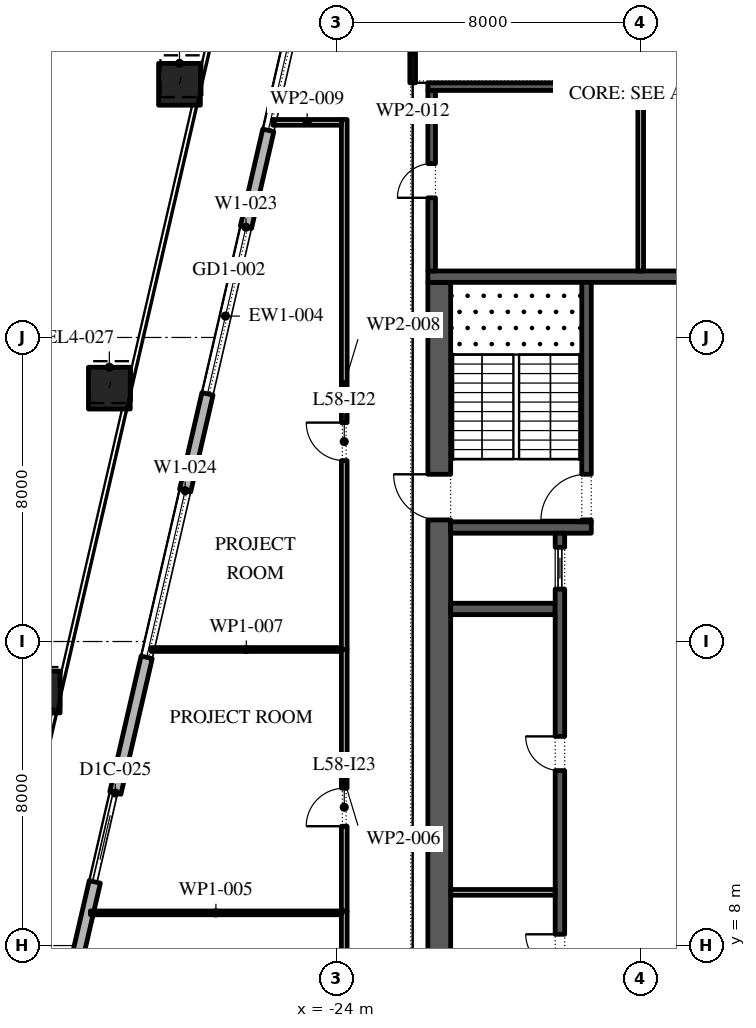
"""IFC4 building model, lengths in metres.
Left out: names, types, materials, properties, quantities, classifications, styles, units other than length and angle.
Written with IfcOpenShell. Run it as: python <this file> out.ifc"""

import sys

from ifc_helpers import new_model, si_unit, direction, frame, frame_2d, origin, origin_2d, place, context, subcontext, project, spatial, rectangle, extrude, element, fill, save


model = new_model("IFC4")
c1 = context("Model", 3, precision=1e-05, world=origin(), true_north=direction((0.0, 1.0)))
c2 = subcontext(c1, "Body", "Model", "MODEL_VIEW")
j1 = project(units=[si_unit("LENGTHUNIT", "METRE"), si_unit("PLANEANGLEUNIT", "RADIAN")], contexts=[c1])
p1 = place(None, origin())
s1 = spatial("IfcSite", under=j1, at=p1, CompositionType="ELEMENT")
p2 = place(p1, origin())
s2 = spatial("IfcBuilding", under=s1, at=p2, CompositionType="ELEMENT")
p3 = place(p2, frame((0.0, 0.0, 268.2)))
s3 = spatial("IfcBuildingStorey", under=s2, at=p3, CompositionType="ELEMENT", Elevation=268.2)
p4 = place(p3, frame((-28.135, 30.662, 0.0), z_axis=(0.01172634467, 0.050504553776, 0.998654986914), x_axis=(-0.974088391429, 0.226167649504, 0.0)))
e1 = element("IfcColumn", 1, at=p4, inside=s3, PredefinedType="COLUMN", context=c2, shape_type="SweptSolid", body=[
    extrude(rectangle(XDim=1.1, YDim=1.1, at=origin_2d()), origin(), (0.0, 0.0, 1.0), 4.206),
])
p5 = place(p3, frame((-29.981, 22.667, 0.0), z_axis=(0.008770884695, 0.037929719907, 0.99924191662), x_axis=(-0.974290512438, 0.225295355862, 0.0)))
e2 = element("IfcColumn", 2, at=p5, inside=s3, PredefinedType="COLUMN", context=c2, shape_type="SweptSolid", body=[
    extrude(rectangle(XDim=1.1, YDim=1.1, at=origin_2d()), origin(), (0.0, 0.0, 1.0), 4.203),
])
p6 = place(p3, frame((-31.827, 14.672, 0.0), z_axis=(0.005869091843, 0.025277771797, 0.999663237302), x_axis=(-0.974088391429, 0.226167649504, 0.0)))
e3 = element("IfcColumn", 3, at=p6, inside=s3, PredefinedType="COLUMN", context=c2, shape_type="SweptSolid", body=[
    extrude(rectangle(XDim=1.1, YDim=1.1, at=origin_2d()), origin(), (0.0, 0.0, 1.0), 4.201),
])
p7 = place(p3, frame((-21.359, 48.678, 0.0), z_axis=(0.0, 0.0, 1.0), x_axis=(-0.224949198343, -0.974370493275, 0.0)))
e4 = element("IfcWall", 4, at=p7, inside=s3, PredefinedType="STANDARD", context=c2, shape_type="SweptSolid", body=[
    extrude(rectangle(XDim=49.5, YDim=0.3, at=frame_2d((24.75, 0.0))), origin(), (0.0, 0.0, 1.0), 4.0),
])
p8 = place(p7, frame((1.157, 0.0, 0.45)))
e5 = element("IfcOpeningElement", 5, at=p8, cuts=e4, PredefinedType="OPENING", context=c2, shape_type="SweptSolid", body=[
    extrude(rectangle(XDim=4.5, YDim=3.05, at=frame_2d((2.25, 1.525))), frame((0.0, 0.16, 0.0), z_axis=(0.0, -1.0, 0.0), x_axis=(1.0, 0.0, 0.0)), (0.0, 0.0, 1.0), 0.32),
])
p9 = place(p7, frame((9.171, 0.0, 0.0)))
e6 = element("IfcOpeningElement", 6, at=p9, cuts=e4, PredefinedType="OPENING", context=c2, shape_type="SweptSolid", body=[
    extrude(rectangle(XDim=2.4, YDim=3.5, at=frame_2d((1.2, 1.75))), frame((0.0, 0.16, 0.0), z_axis=(0.0, -1.0, 0.0), x_axis=(1.0, 0.0, 0.0)), (0.0, 0.0, 1.0), 0.32),
])
p10 = place(p7, frame((15.236, 0.0, 0.45)))
e7 = element("IfcOpeningElement", 7, at=p10, cuts=e4, PredefinedType="OPENING", context=c2, shape_type="SweptSolid", body=[
    extrude(rectangle(XDim=4.5, YDim=3.05, at=frame_2d((2.25, 1.525))), frame((0.0, 0.16, 0.0), z_axis=(0.0, -1.0, 0.0), x_axis=(1.0, 0.0, 0.0)), (0.0, 0.0, 1.0), 0.32),
])
p11 = place(p7, frame((22.35, 0.0, 0.45)))
e8 = element("IfcOpeningElement", 8, at=p11, cuts=e4, PredefinedType="OPENING", context=c2, shape_type="SweptSolid", body=[
    extrude(rectangle(XDim=4.5, YDim=3.05, at=frame_2d((2.25, 1.525))), frame((0.0, 0.16, 0.0), z_axis=(0.0, -1.0, 0.0), x_axis=(1.0, 0.0, 0.0)), (0.0, 0.0, 1.0), 0.32),
])
p12 = place(p7, frame((29.464, 0.0, 0.45)))
e9 = element("IfcOpeningElement", 9, at=p12, cuts=e4, PredefinedType="OPENING", context=c2, shape_type="SweptSolid", body=[
    extrude(rectangle(XDim=4.5, YDim=3.05, at=frame_2d((2.25, 1.525))), frame((0.0, 0.16, 0.0), z_axis=(0.0, -1.0, 0.0), x_axis=(1.0, 0.0, 0.0)), (0.0, 0.0, 1.0), 0.32),
])
p13 = place(p7, frame((37.628, 0.0, 0.0)))
e10 = element("IfcOpeningElement", 10, at=p13, cuts=e4, PredefinedType="OPENING", context=c2, shape_type="SweptSolid", body=[
    extrude(rectangle(XDim=2.4, YDim=3.325, at=frame_2d((1.2, 1.663))), frame((0.0, 0.16, 0.0), z_axis=(0.0, -1.0, 0.0), x_axis=(1.0, 0.0, 0.0)), (0.0, 0.0, 1.0), 0.32),
])
p14 = place(p7, frame((43.693, 0.0, 0.45)))
e11 = element("IfcOpeningElement", 11, at=p14, cuts=e4, PredefinedType="OPENING", context=c2, shape_type="SweptSolid", body=[
    extrude(rectangle(XDim=4.5, YDim=2.825, at=frame_2d((2.25, 1.413))), frame((0.0, 0.16, 0.0), z_axis=(0.0, -1.0, 0.0), x_axis=(1.0, 0.0, 0.0)), (0.0, 0.0, 1.0), 0.32),
])
p15 = place(p3, frame((-21.3, -2.45, 0.0), z_axis=(0.0, 0.0, 1.0), x_axis=(0.0, 1.0, 0.0)))
e12 = element("IfcWall", 12, at=p15, inside=s3, PredefinedType="SHEAR", context=c2, shape_type="SweptSolid", body=[
    extrude(rectangle(XDim=27.9, YDim=0.6, at=frame_2d((13.95, 0.0))), origin(), (0.0, 0.0, 1.0), 4.0),
])
p16 = place(p15, frame((5.05, 0.0, 0.0)))
e13 = element("IfcOpeningElement", 13, at=p16, cuts=e12, PredefinedType="OPENING", context=c2, shape_type="SweptSolid", body=[
    extrude(rectangle(XDim=1.2, YDim=2.1, at=frame_2d((0.6, 1.05))), frame((0.0, 0.31, 0.0), z_axis=(0.0, -1.0, 0.0), x_axis=(1.0, 0.0, 0.0)), (0.0, 0.0, 1.0), 0.62),
])
p17 = place(p15, frame((21.65, 0.0, 0.0)))
e14 = element("IfcOpeningElement", 14, at=p17, cuts=e12, PredefinedType="OPENING", context=c2, shape_type="SweptSolid", body=[
    extrude(rectangle(XDim=1.2, YDim=2.1, at=frame_2d((0.6, 1.05))), frame((0.0, 0.31, 0.0), z_axis=(0.0, -1.0, 0.0), x_axis=(1.0, 0.0, 0.0)), (0.0, 0.0, 1.0), 0.62),
])
p18 = place(p3, frame((-21.6, 25.6, 0.0), z_axis=(0.0, 0.0, 1.0), x_axis=(1.0, 0.0, 0.0)))
e15 = element("IfcWall", 15, at=p18, inside=s3, PredefinedType="SHEAR", context=c2, shape_type="SweptSolid", body=[
    extrude(rectangle(XDim=11.2, YDim=0.3, at=frame_2d((5.6, 0.0))), origin(), (0.0, 0.0, 1.0), 4.0),
])
p19 = place(p3, frame((-21.0, 19.0, 0.0), z_axis=(0.0, 0.0, 1.0), x_axis=(1.0, 0.0, 0.0)))
e16 = element("IfcWall", 16, at=p19, inside=s3, PredefinedType="SHEAR", context=c2, shape_type="SweptSolid", body=[
    extrude(rectangle(XDim=3.7, YDim=0.3, at=frame_2d((1.85, 0.0))), origin(), (0.0, 0.0, 1.0), 4.0),
])
p20 = place(p3, frame((-17.425, 19.15, 0.0), z_axis=(0.0, 0.0, 1.0), x_axis=(0.0, 1.0, 0.0)))
e17 = element("IfcWall", 17, at=p20, inside=s3, PredefinedType="SHEAR", context=c2, shape_type="SweptSolid", body=[
    extrude(rectangle(XDim=6.3, YDim=0.25, at=frame_2d((3.15, 0.0))), origin(), (0.0, 0.0, 1.0), 4.0),
])
p21 = place(p20, frame((0.05, 0.0, 0.0)))
e18 = element("IfcOpeningElement", 18, at=p21, cuts=e17, PredefinedType="OPENING", context=c2, shape_type="SweptSolid", body=[
    extrude(rectangle(XDim=1.2, YDim=2.1, at=frame_2d((0.6, 1.05))), frame((0.0, 0.135, 0.0), z_axis=(0.0, -1.0, 0.0), x_axis=(1.0, 0.0, 0.0)), (0.0, 0.0, 1.0), 0.27),
])
p22 = place(p3, frame((-21.0, 16.857, 0.0), z_axis=(0.0, 0.0, 1.0), x_axis=(1.0, 0.0, 0.0)))
e19 = element("IfcWall", 19, at=p22, inside=s3, PredefinedType="SHEAR", context=c2, shape_type="SweptSolid", body=[
    extrude(rectangle(XDim=2.75, YDim=0.3, at=frame_2d((1.375, 0.0))), origin(), (0.0, 0.0, 1.0), 4.0),
])
p23 = place(p3, frame((-18.125, 4.15, 0.0), z_axis=(0.0, 0.0, 1.0), x_axis=(0.0, 1.0, 0.0)))
e20 = element("IfcWall", 20, at=p23, inside=s3, PredefinedType="SHEAR", context=c2, shape_type="SweptSolid", body=[
    extrude(rectangle(XDim=14.7, YDim=0.25, at=frame_2d((7.35, 0.0))), origin(), (0.0, 0.0, 1.0), 4.0),
])
p24 = place(p23, frame((3.246, 0.0, 0.0)))
e21 = element("IfcOpeningElement", 21, at=p24, cuts=e20, PredefinedType="OPENING", context=c2, shape_type="SweptSolid", body=[
    extrude(rectangle(XDim=0.9, YDim=2.1, at=frame_2d((0.45, 1.05))), frame((0.0, 0.135, 0.0), z_axis=(0.0, -1.0, 0.0), x_axis=(1.0, 0.0, 0.0)), (0.0, 0.0, 1.0), 0.27),
])
p25 = place(p23, frame((8.454, 0.0, 0.0)))
e22 = element("IfcOpeningElement", 22, at=p25, cuts=e20, PredefinedType="OPENING", context=c2, shape_type="SweptSolid", body=[
    extrude(rectangle(XDim=0.9, YDim=2.1, at=frame_2d((0.45, 1.05))), frame((0.0, 0.135, 0.0), z_axis=(0.0, -1.0, 0.0), x_axis=(1.0, 0.0, 0.0)), (0.0, 0.0, 1.0), 0.27),
])
p26 = place(p23, frame((0.371, 0.0, 0.0)))
e23 = element("IfcOpeningElement", 23, at=p26, cuts=e20, PredefinedType="OPENING", context=c2, shape_type="SweptSolid", body=[
    extrude(rectangle(XDim=1.1, YDim=2.1, at=frame_2d((0.55, 1.05))), frame((0.0, 0.135, 0.0), z_axis=(0.0, -1.0, 0.0), x_axis=(1.0, 0.0, 0.0)), (0.0, 0.0, 1.0), 0.27),
])
p27 = place(p23, frame((13.229, 0.0, 0.0)))
e24 = element("IfcOpeningElement", 24, at=p27, cuts=e20, PredefinedType="OPENING", context=c2, shape_type="SweptSolid", body=[
    extrude(rectangle(XDim=1.1, YDim=2.1, at=frame_2d((0.55, 1.05))), frame((0.0, 0.135, 0.0), z_axis=(0.0, -1.0, 0.0), x_axis=(1.0, 0.0, 0.0)), (0.0, 0.0, 1.0), 0.27),
])
p28 = place(p3, frame((-21.0, 9.4, 0.0), z_axis=(0.0, 0.0, 1.0), x_axis=(1.0, 0.0, 0.0)))
e25 = element("IfcWall", 25, at=p28, inside=s3, PredefinedType="PARTITIONING", context=c2, shape_type="SweptSolid", body=[
    extrude(rectangle(XDim=2.75, YDim=0.15, at=frame_2d((1.375, 0.0))), origin(), (0.0, 0.0, 1.0), 4.0),
])
p29 = place(p3, frame((-21.5, 25.75, 0.0), z_axis=(0.0, 0.0, 1.0), x_axis=(0.0, 1.0, 0.0)))
e26 = element("IfcWall", 26, at=p29, inside=s3, PredefinedType="SHEAR", context=c2, shape_type="SweptSolid", body=[
    extrude(rectangle(XDim=4.75, YDim=0.2, at=frame_2d((2.375, 0.0))), origin(), (0.0, 0.0, 1.0), 4.0),
])
p30 = place(p29, frame((1.925, 0.0, 0.0)))
e27 = element("IfcOpeningElement", 27, at=p30, cuts=e26, PredefinedType="OPENING", context=c2, shape_type="SweptSolid", body=[
    extrude(rectangle(XDim=0.9, YDim=2.1, at=frame_2d((0.45, 1.05))), frame((0.0, 0.11, 0.0), z_axis=(0.0, -1.0, 0.0), x_axis=(1.0, 0.0, 0.0)), (0.0, 0.0, 1.0), 0.22),
])
p31 = place(p3, frame((-21.6, 30.6, 0.0), z_axis=(0.0, 0.0, 1.0), x_axis=(1.0, 0.0, 0.0)))
e28 = element("IfcWall", 28, at=p31, inside=s3, PredefinedType="SHEAR", context=c2, shape_type="SweptSolid", body=[
    extrude(rectangle(XDim=11.2, YDim=0.2, at=frame_2d((5.6, 0.0))), origin(), (0.0, 0.0, 1.0), 4.0),
])
p32 = place(p3, frame((-16.0, 25.75, 0.0), z_axis=(0.0, 0.0, 1.0), x_axis=(0.0, 1.0, 0.0)))
e29 = element("IfcWall", 29, at=p32, inside=s3, PredefinedType="PARTITIONING", context=c2, shape_type="SweptSolid", body=[
    extrude(rectangle(XDim=4.75, YDim=0.15, at=frame_2d((2.375, 0.0))), origin(), (0.0, 0.0, 1.0), 4.0),
])
p33 = place(p3, frame((-23.8, 0.41, 0.0), z_axis=(0.0, 0.0, 1.0), x_axis=(0.0, 1.0, 0.0)))
e30 = element("IfcWall", 30, at=p33, inside=s3, PredefinedType="PARTITIONING", context=c2, shape_type="SweptSolid", body=[
    extrude(rectangle(XDim=8.5, YDim=0.15, at=frame_2d((4.25, 0.0))), origin(), (0.0, 0.0, 1.0), 4.0),
])
p34 = place(p33, frame((5.3, 0.0, 0.0)))
e31 = element("IfcOpeningElement", 31, at=p34, cuts=e30, PredefinedType="OPENING", context=c2, shape_type="SweptSolid", body=[
    extrude(rectangle(XDim=1.0, YDim=2.1, at=frame_2d((0.5, 1.05))), frame((0.0, 0.085, 0.0), z_axis=(0.0, -1.0, 0.0), x_axis=(1.0, 0.0, 0.0)), (0.0, 0.0, 1.0), 0.17),
])
p35 = place(p3, frame((-23.875, 8.86, 0.0), z_axis=(0.0, 0.0, 1.0), x_axis=(-1.0, 0.0, 0.0)))
e32 = element("IfcWall", 32, at=p35, inside=s3, PredefinedType="PARTITIONING", context=c2, shape_type="SweptSolid", body=[
    extrude(rectangle(XDim=6.605, YDim=0.1, at=frame_2d((3.302, 0.0))), origin(), (0.0, 0.0, 1.0), 4.0),
])
p36 = place(p3, frame((-23.8, 8.91, 0.0), z_axis=(0.0, 0.0, 1.0), x_axis=(0.0, 1.0, 0.0)))
e33 = element("IfcWall", 33, at=p36, inside=s3, PredefinedType="PARTITIONING", context=c2, shape_type="SweptSolid", body=[
    extrude(rectangle(XDim=6.88, YDim=0.15, at=frame_2d((3.44, 0.0))), origin(), (0.0, 0.0, 1.0), 4.0),
])
p37 = place(p36, frame((2.23, 0.0, 0.0)))
e34 = element("IfcOpeningElement", 34, at=p37, cuts=e33, PredefinedType="OPENING", context=c2, shape_type="SweptSolid", body=[
    extrude(rectangle(XDim=1.0, YDim=2.1, at=frame_2d((0.5, 1.05))), frame((0.0, 0.085, 0.0), z_axis=(0.0, -1.0, 0.0), x_axis=(1.0, 0.0, 0.0)), (0.0, 0.0, 1.0), 0.17),
])
p38 = place(p3, frame((-23.875, 15.79, 0.0), z_axis=(0.0, 0.0, 1.0), x_axis=(-1.0, 0.0, 0.0)))
e35 = element("IfcWall", 35, at=p38, inside=s3, PredefinedType="PARTITIONING", context=c2, shape_type="SweptSolid", body=[
    extrude(rectangle(XDim=5.005, YDim=0.1, at=frame_2d((2.502, 0.0))), origin(), (0.0, 0.0, 1.0), 4.0),
])
p39 = place(p3, frame((-23.8, 15.79, 0.0), z_axis=(0.0, 0.0, 1.0), x_axis=(0.0, 1.0, 0.0)))
e36 = element("IfcWall", 36, at=p39, inside=s3, PredefinedType="PARTITIONING", context=c2, shape_type="SweptSolid", body=[
    extrude(rectangle(XDim=13.945, YDim=0.15, at=frame_2d((6.973, 0.0))), origin(), (0.0, 0.0, 1.0), 4.0),
])
p40 = place(p39, frame((4.97, 0.0, 0.0)))
e37 = element("IfcOpeningElement", 37, at=p40, cuts=e36, PredefinedType="OPENING", context=c2, shape_type="SweptSolid", body=[
    extrude(rectangle(XDim=1.0, YDim=2.1, at=frame_2d((0.5, 1.05))), frame((0.0, 0.085, 0.0), z_axis=(0.0, -1.0, 0.0), x_axis=(1.0, 0.0, 0.0)), (0.0, 0.0, 1.0), 0.17),
])
p41 = place(p3, frame((-23.875, 29.66, 0.0), z_axis=(0.0, 0.0, 1.0), x_axis=(-1.0, 0.0, 0.0)))
e38 = element("IfcWall", 38, at=p41, inside=s3, PredefinedType="PARTITIONING", context=c2, shape_type="SweptSolid", body=[
    extrude(rectangle(XDim=1.803, YDim=0.15, at=frame_2d((0.901, 0.0))), origin(), (0.0, 0.0, 1.0), 4.0),
])
p42 = place(p3, frame((-22.0, 32.425, 0.0), z_axis=(0.0, 0.0, 1.0), x_axis=(0.0, -1.0, 0.0)))
e39 = element("IfcWall", 39, at=p42, inside=s3, PredefinedType="PARTITIONING", context=c2, shape_type="SweptSolid", body=[
    extrude(rectangle(XDim=1.725, YDim=0.15, at=frame_2d((0.863, 0.0))), origin(), (0.0, 0.0, 1.0), 4.0),
])
p43 = place(p10, origin())
e40 = element("IfcWindow", 40, at=p43, inside=s3, PartitioningType="DOUBLE_PANEL_VERTICAL", PredefinedType="WINDOW", context=c2, shape_type="SweptSolid", body=[
    extrude(rectangle(XDim=4.5, YDim=3.05, at=frame_2d((2.25, 1.525))), frame((0.0, 0.03, 0.0), z_axis=(0.0, -1.0, 0.0), x_axis=(1.0, 0.0, 0.0)), (0.0, 0.0, 1.0), 0.06),
])
fill(e7, e40)
p44 = place(p11, origin())
e41 = element("IfcWindow", 41, at=p44, inside=s3, PartitioningType="DOUBLE_PANEL_VERTICAL", PredefinedType="WINDOW", context=c2, shape_type="SweptSolid", body=[
    extrude(rectangle(XDim=4.5, YDim=3.05, at=frame_2d((2.25, 1.525))), frame((0.0, 0.03, 0.0), z_axis=(0.0, -1.0, 0.0), x_axis=(1.0, 0.0, 0.0)), (0.0, 0.0, 1.0), 0.06),
])
fill(e8, e41)
p45 = place(p12, origin())
e42 = element("IfcWindow", 42, at=p45, inside=s3, PartitioningType="DOUBLE_PANEL_VERTICAL", PredefinedType="WINDOW", context=c2, shape_type="SweptSolid", body=[
    extrude(rectangle(XDim=4.5, YDim=3.05, at=frame_2d((2.25, 1.525))), frame((0.0, 0.03, 0.0), z_axis=(0.0, -1.0, 0.0), x_axis=(1.0, 0.0, 0.0)), (0.0, 0.0, 1.0), 0.06),
])
fill(e9, e42)
p46 = place(p13, origin())
e43 = element("IfcDoor", 43, at=p46, inside=s3, OperationType="DOUBLE_DOOR_SLIDING", PredefinedType="DOOR", context=c2, shape_type="SweptSolid", body=[
    extrude(rectangle(XDim=2.4, YDim=3.325, at=frame_2d((1.2, 1.663))), frame((0.0, 0.025, 0.0), z_axis=(0.0, -1.0, 0.0), x_axis=(1.0, 0.0, 0.0)), (0.0, 0.0, 1.0), 0.05),
])
fill(e10, e43)
p47 = place(p24, origin())
e44 = element("IfcDoor", 44, at=p47, inside=s3, OperationType="SINGLE_SWING_LEFT", PredefinedType="DOOR", context=c2, shape_type="SweptSolid", body=[
    extrude(rectangle(XDim=0.9, YDim=2.1, at=frame_2d((0.45, 1.05))), frame((0.0, 0.125, 0.0), z_axis=(0.0, -1.0, 0.0), x_axis=(1.0, 0.0, 0.0)), (0.0, 0.0, 1.0), 0.05),
])
fill(e21, e44)
p48 = place(p25, origin())
e45 = element("IfcDoor", 45, at=p48, inside=s3, OperationType="SINGLE_SWING_LEFT", PredefinedType="DOOR", context=c2, shape_type="SweptSolid", body=[
    extrude(rectangle(XDim=0.9, YDim=2.1, at=frame_2d((0.45, 1.05))), frame((0.0, 0.125, 0.0), z_axis=(0.0, -1.0, 0.0), x_axis=(1.0, 0.0, 0.0)), (0.0, 0.0, 1.0), 0.05),
])
fill(e22, e45)
p49 = place(p27, origin())
e46 = element("IfcDoor", 46, at=p49, inside=s3, OperationType="SLIDING_TO_LEFT", PredefinedType="DOOR", context=c2, shape_type="SweptSolid", body=[
    extrude(rectangle(XDim=1.1, YDim=2.1, at=frame_2d((0.55, 1.05))), frame((0.0, 0.025, 0.0), z_axis=(0.0, -1.0, 0.0), x_axis=(1.0, 0.0, 0.0)), (0.0, 0.0, 1.0), 0.05),
])
fill(e24, e46)
p50 = place(p21, origin())
e47 = element("IfcDoor", 47, at=p50, inside=s3, OperationType="SINGLE_SWING_RIGHT", PredefinedType="DOOR", context=c2, shape_type="SweptSolid", body=[
    extrude(rectangle(XDim=1.2, YDim=2.1, at=frame_2d((0.6, 1.05))), frame((0.0, 0.025, 0.0), z_axis=(0.0, -1.0, 0.0), x_axis=(1.0, 0.0, 0.0)), (0.0, 0.0, 1.0), 0.05),
])
fill(e18, e47)
p51 = place(p17, origin())
e48 = element("IfcDoor", 48, at=p51, inside=s3, OperationType="SINGLE_SWING_LEFT", PredefinedType="DOOR", context=c2, shape_type="SweptSolid", body=[
    extrude(rectangle(XDim=1.2, YDim=2.1, at=frame_2d((0.6, 1.05))), frame((0.0, 0.025, 0.0), z_axis=(0.0, -1.0, 0.0), x_axis=(1.0, 0.0, 0.0)), (0.0, 0.0, 1.0), 0.05),
])
fill(e14, e48)
p52 = place(p30, origin())
e49 = element("IfcDoor", 49, at=p52, inside=s3, OperationType="SINGLE_SWING_RIGHT", PredefinedType="DOOR", context=c2, shape_type="SweptSolid", body=[
    extrude(rectangle(XDim=0.9, YDim=2.1, at=frame_2d((0.45, 1.05))), frame((0.0, -0.05, 0.0), z_axis=(0.0, -1.0, 0.0), x_axis=(1.0, 0.0, 0.0)), (0.0, 0.0, 1.0), 0.05),
])
fill(e27, e49)
p53 = place(p40, origin())
e50 = element("IfcDoor", 50, at=p53, inside=s3, OperationType="SINGLE_SWING_LEFT", PredefinedType="DOOR", context=c2, shape_type="SweptSolid", body=[
    extrude(rectangle(XDim=1.0, YDim=2.1, at=frame_2d((0.5, 1.05))), frame((0.0, 0.025, 0.0), z_axis=(0.0, -1.0, 0.0), x_axis=(1.0, 0.0, 0.0)), (0.0, 0.0, 1.0), 0.05),
])
fill(e37, e50)
p54 = place(p37, origin())
e51 = element("IfcDoor", 51, at=p54, inside=s3, OperationType="SINGLE_SWING_RIGHT", PredefinedType="DOOR", context=c2, shape_type="SweptSolid", body=[
    extrude(rectangle(XDim=1.0, YDim=2.1, at=frame_2d((0.5, 1.05))), frame((0.0, 0.025, 0.0), z_axis=(0.0, -1.0, 0.0), x_axis=(1.0, 0.0, 0.0)), (0.0, 0.0, 1.0), 0.05),
])
fill(e34, e51)
save(model, sys.argv[1])
